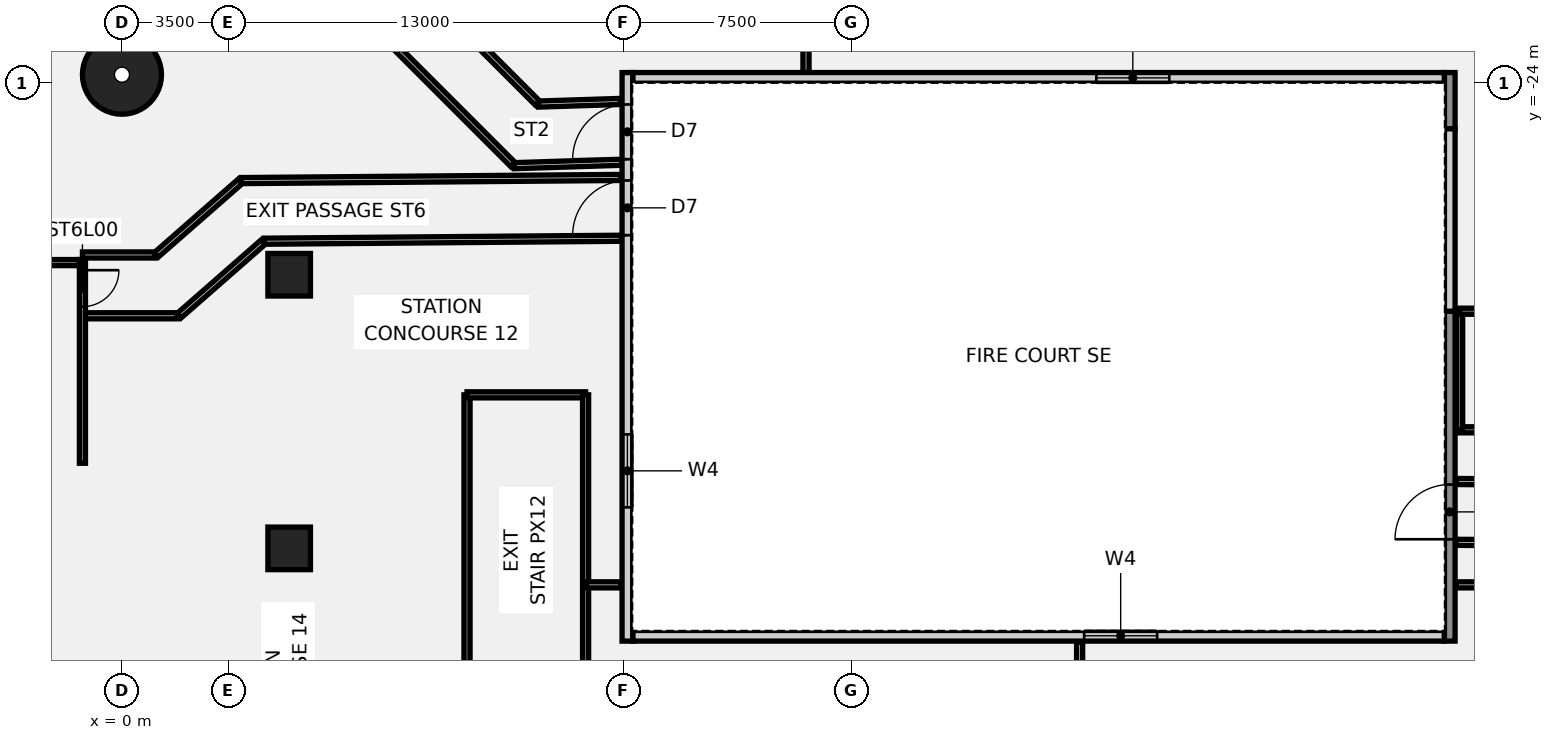
"""IFC4 building model, lengths in metres.
Left out: names, types, materials, properties, quantities, classifications, styles, units other than length and angle.
Written with IfcOpenShell. Run it as: python <this file> out.ifc"""

import sys

from ifc_helpers import new_model, si_unit, direction, frame, frame_2d, origin, origin_2d, place, context, subcontext, project, spatial, polyline, rectangle, circle, outline, extrude, element, fill, save


model = new_model("IFC4")
c1 = context("Model", 3, precision=1e-05, world=origin(), true_north=direction((0.0, 1.0)))
c2 = subcontext(c1, "Body", "Model", "MODEL_VIEW")
j1 = project(units=[si_unit("LENGTHUNIT", "METRE"), si_unit("PLANEANGLEUNIT", "RADIAN")], contexts=[c1])
p1 = place(None, origin())
s1 = spatial("IfcSite", under=j1, at=p1, CompositionType="ELEMENT")
p2 = place(p1, origin())
s2 = spatial("IfcBuilding", under=s1, at=p2, CompositionType="ELEMENT")
p3 = place(p2, origin())
s3 = spatial("IfcBuildingStorey", under=s2, at=p3, CompositionType="ELEMENT", Elevation=0.0)
p4 = place(p3, frame((0.0, -23.721, -0.55), z_axis=(0.0, 0.0, 1.0), x_axis=(1.0, 0.0, 0.0)))
e1 = element("IfcColumn", 1, at=p4, inside=s3, PredefinedType="COLUMN", context=c2, shape_type="SweptSolid", body=[
    extrude(circle(Radius=1.3, at=origin_2d()), origin(), (0.0, 0.0, 1.0), 9.05),
])
for number, where, z_axis, x_axis in (
    (2, (5.5, -39.3, -0.55), (0.0, 0.0, 1.0), (1.0, 0.0, 0.0)),
    (3, (5.5, -30.3, -0.55), (0.0, 0.0, 1.0), (1.0, 0.0, 0.0)),
):
    element("IfcColumn", number, at=place(p3, frame(where, z_axis=z_axis, x_axis=x_axis)), inside=s3, PredefinedType="COLUMN", context=c2, shape_type="SweptSolid", body=[
        extrude(rectangle(XDim=1.4, YDim=1.4, at=origin_2d()), origin(), (0.0, 0.0, 1.0), 9.05),
    ])
p5 = place(p3, frame((11.35, -45.75, 0.0), z_axis=(0.0, 0.0, 1.0), x_axis=(0.0, 1.0, 0.0)))
e4 = element("IfcWall", 4, at=p5, inside=s3, PredefinedType="PARTITIONING", context=c2, shape_type="SweptSolid", body=[
    extrude(rectangle(XDim=11.5, YDim=0.2, at=frame_2d((5.75, 0.0))), origin(), (0.0, 0.0, 1.0), 8.5),
])
p6 = place(p3, frame((11.35, -34.25, 0.0), z_axis=(0.0, 0.0, 1.0), x_axis=(1.0, 0.0, 0.0)))
e5 = element("IfcWall", 5, at=p6, inside=s3, PredefinedType="PARTITIONING", context=c2, shape_type="SweptSolid", body=[
    extrude(rectangle(XDim=3.9, YDim=0.2, at=frame_2d((1.95, 0.0))), origin(), (0.0, 0.0, 1.0), 8.5),
])
p7 = place(p3, frame((15.25, -45.75, 0.0), z_axis=(0.0, 0.0, 1.0), x_axis=(0.0, 1.0, 0.0)))
e6 = element("IfcWall", 6, at=p7, inside=s3, PredefinedType="PARTITIONING", context=c2, shape_type="SweptSolid", body=[
    extrude(rectangle(XDim=11.5, YDim=0.2, at=frame_2d((5.75, 0.0))), origin(), (0.0, 0.0, 1.0), 8.5),
])
p8 = place(p3, frame((44.0, -35.4, 0.0), z_axis=(0.0, 0.0, 1.0), x_axis=(1.0, 0.0, 0.0)))
e7 = element("IfcWall", 7, at=p8, inside=s3, PredefinedType="PARTITIONING", context=c2, shape_type="SweptSolid", body=[
    extrude(rectangle(XDim=11.5, YDim=0.2, at=frame_2d((5.75, 0.0))), origin(), (0.0, 0.0, 1.0), 8.5),
])
p9 = place(p8, frame((9.94, 0.0, 0.0)))
e8 = element("IfcOpeningElement", 8, at=p9, cuts=e7, PredefinedType="OPENING", context=c2, shape_type="SweptSolid", body=[
    extrude(rectangle(XDim=1.2, YDim=2.1, at=frame_2d((0.6, 1.05))), frame((0.0, 0.11, 0.0), z_axis=(0.0, -1.0, 0.0), x_axis=(1.0, 0.0, 0.0)), (0.0, 0.0, 1.0), 0.22),
])
p10 = place(p3, frame((44.0, -35.4, 0.0), z_axis=(0.0, 0.0, 1.0), x_axis=(0.0, 1.0, 0.0)))
e9 = element("IfcWall", 9, at=p10, inside=s3, PredefinedType="PARTITIONING", context=c2, shape_type="SweptSolid", body=[
    extrude(rectangle(XDim=3.9, YDim=0.2, at=frame_2d((1.95, 0.0))), origin(), (0.0, 0.0, 1.0), 8.5),
])
p11 = place(p3, frame((44.0, -31.5, 0.0), z_axis=(0.0, 0.0, 1.0), x_axis=(1.0, 0.0, 0.0)))
e10 = element("IfcWall", 10, at=p11, inside=s3, PredefinedType="PARTITIONING", context=c2, shape_type="SweptSolid", body=[
    extrude(rectangle(XDim=11.5, YDim=0.2, at=frame_2d((5.75, 0.0))), origin(), (0.0, 0.0, 1.0), 8.5),
])
p12 = place(p3, frame((15.28, -40.5, 0.0), z_axis=(0.0, 0.0, 1.0), x_axis=(1.0, 0.0, 0.0)))
e11 = element("IfcWall", 11, at=p12, inside=s3, PredefinedType="PARTITIONING", context=c2, shape_type="SweptSolid", body=[
    extrude(rectangle(XDim=1.14, YDim=0.2, at=frame_2d((0.57, 0.0))), origin(), (0.0, 0.0, 1.0), 8.5),
])
p13 = place(p3, frame((31.5, -59.699, 0.0), z_axis=(0.0, 0.0, 1.0), x_axis=(0.0, 1.0, 0.0)))
e12 = element("IfcWall", 12, at=p13, inside=s3, PredefinedType="PARTITIONING", context=c2, shape_type="SweptSolid", body=[
    extrude(rectangle(XDim=17.319, YDim=0.2, at=frame_2d((8.66, 0.0))), origin(), (0.0, 0.0, 1.0), 8.5),
])
p14 = place(p3, frame((43.88, -40.5, 0.0), z_axis=(0.0, 0.0, 1.0), x_axis=(1.0, 0.0, 0.0)))
e13 = element("IfcWall", 13, at=p14, inside=s3, PredefinedType="PARTITIONING", context=c2, shape_type="SweptSolid", body=[
    extrude(rectangle(XDim=25.819, YDim=0.2, at=frame_2d((12.91, 0.0))), origin(), (0.0, 0.0, 1.0), 8.5),
])
p15 = place(p14, frame((17.663, 0.0, 0.0)))
e14 = element("IfcOpeningElement", 14, at=p15, cuts=e13, PredefinedType="OPENING", context=c2, shape_type="SweptSolid", body=[
    extrude(rectangle(XDim=1.8, YDim=2.1, at=frame_2d((0.9, 1.05))), frame((0.0, 0.11, 0.0), z_axis=(0.0, -1.0, 0.0), x_axis=(1.0, 0.0, 0.0)), (0.0, 0.0, 1.0), 0.22),
])
p16 = place(p3, frame((22.5, -18.5, 0.0), z_axis=(0.0, 0.0, 1.0), x_axis=(0.0, -1.0, 0.0)))
e15 = element("IfcWall", 15, at=p16, inside=s3, PredefinedType="PARTITIONING", context=c2, shape_type="SweptSolid", body=[
    extrude(rectangle(XDim=5.15, YDim=0.2, at=frame_2d((2.575, 0.0))), origin(), (0.0, 0.0, 1.0), 8.5),
])
p17 = place(p3, frame((-1.3, -29.65, 0.0), z_axis=(0.0, 0.0, 1.0), x_axis=(1.0, 0.0, 0.0)))
e16 = element("IfcWall", 16, at=p17, inside=s3, PredefinedType="PARTITIONING", context=c2, shape_type="SweptSolid", body=[
    extrude(rectangle(XDim=2.374, YDim=0.2, at=frame_2d((1.187, 0.0))), origin(), (0.0, 0.0, 1.0), 8.5),
])
p18 = place(p3, frame((1.124, -29.65, 0.0), z_axis=(0.0, 0.0, 1.0), x_axis=(0.752593197415, 0.658485747154, 0.0)))
e17 = element("IfcWall", 17, at=p18, inside=s3, PredefinedType="PARTITIONING", context=c2, shape_type="SweptSolid", body=[
    extrude(rectangle(XDim=3.666, YDim=0.2, at=frame_2d((1.833, 0.0))), origin(), (0.0, 0.0, 1.0), 8.5),
])
p19 = place(p3, frame((3.921, -27.203, 0.0), z_axis=(0.0, 0.0, 1.0), x_axis=(0.999965985762, 0.008247867521, 0.0)))
e18 = element("IfcWall", 18, at=p19, inside=s3, PredefinedType="PARTITIONING", context=c2, shape_type="SweptSolid", body=[
    extrude(rectangle(XDim=12.491, YDim=0.2, at=frame_2d((6.246, 0.0))), origin(), (0.0, 0.0, 1.0), 8.5),
])
p20 = place(p3, frame((-1.3, -31.65, 0.0), z_axis=(0.0, 0.0, 1.0), x_axis=(1.0, 0.0, 0.0)))
e19 = element("IfcWall", 19, at=p20, inside=s3, PredefinedType="PARTITIONING", context=c2, shape_type="SweptSolid", body=[
    extrude(rectangle(XDim=3.126, YDim=0.2, at=frame_2d((1.563, 0.0))), origin(), (0.0, 0.0, 1.0), 8.5),
])
p21 = place(p3, frame((1.876, -31.65, 0.0), z_axis=(0.0, 0.0, 1.0), x_axis=(0.75257257963, 0.658509310784, 0.0)))
e20 = element("IfcWall", 20, at=p21, inside=s3, PredefinedType="PARTITIONING", context=c2, shape_type="SweptSolid", body=[
    extrude(rectangle(XDim=3.675, YDim=0.2, at=frame_2d((1.838, 0.0))), origin(), (0.0, 0.0, 1.0), 8.5),
])
p22 = place(p3, frame((4.679, -29.197, 0.0), z_axis=(0.0, 0.0, 1.0), x_axis=(0.99996597443, 0.008249241373, 0.0)))
e21 = element("IfcWall", 21, at=p22, inside=s3, PredefinedType="PARTITIONING", context=c2, shape_type="SweptSolid", body=[
    extrude(rectangle(XDim=11.75, YDim=0.2, at=frame_2d((5.875, 0.0))), origin(), (0.0, 0.0, 1.0), 8.5),
])
p23 = place(p3, frame((7.738, -18.724, 0.0), z_axis=(0.0, 0.0, 1.0), x_axis=(0.707121343443, -0.70709221863, 0.0)))
e22 = element("IfcWall", 22, at=p23, inside=s3, PredefinedType="PARTITIONING", context=c2, shape_type="SweptSolid", body=[
    extrude(rectangle(XDim=8.383, YDim=0.2, at=frame_2d((4.191, 0.0))), origin(), (0.0, 0.0, 1.0), 8.5),
])
p24 = place(p3, frame((13.701, -24.687, 0.0), z_axis=(0.0, 0.0, 1.0), x_axis=(0.999488950114, 0.031966210289, 0.0)))
e23 = element("IfcWall", 23, at=p24, inside=s3, PredefinedType="PARTITIONING", context=c2, shape_type="SweptSolid", body=[
    extrude(rectangle(XDim=2.688, YDim=0.2, at=frame_2d((1.344, 0.0))), origin(), (0.0, 0.0, 1.0), 8.5),
])
p25 = place(p3, frame((5.862, -19.676, 0.0), z_axis=(0.0, 0.0, 1.0), x_axis=(0.707106781187, -0.707106781187, 0.0)))
e24 = element("IfcWall", 24, at=p25, inside=s3, PredefinedType="PARTITIONING", context=c2, shape_type="SweptSolid", body=[
    extrude(rectangle(XDim=9.902, YDim=0.2, at=frame_2d((4.951, 0.0))), origin(), (0.0, 0.0, 1.0), 8.5),
])
p26 = place(p3, frame((12.899, -26.713, 0.0), z_axis=(0.0, 0.0, 1.0), x_axis=(0.999487091524, 0.032024270122, 0.0)))
e25 = element("IfcWall", 25, at=p26, inside=s3, PredefinedType="PARTITIONING", context=c2, shape_type="SweptSolid", body=[
    extrude(rectangle(XDim=3.552, YDim=0.2, at=frame_2d((1.776, 0.0))), origin(), (0.0, 0.0, 1.0), 8.5),
])
p27 = place(p3, frame((55.725, -39.209, 0.0), z_axis=(0.0, 0.0, 1.0), x_axis=(-0.999957626969, 0.009205664901, 0.0)))
e26 = element("IfcWall", 26, at=p27, inside=s3, PredefinedType="PARTITIONING", context=c2, shape_type="SweptSolid", body=[
    extrude(rectangle(XDim=11.855, YDim=0.2, at=frame_2d((5.927, 0.0))), origin(), (0.0, 0.0, 1.0), 8.5),
])
p28 = place(p3, frame((53.725, -37.191, 0.0), z_axis=(0.0, 0.0, 1.0), x_axis=(-0.999957602643, 0.009208306954, 0.0)))
e27 = element("IfcWall", 27, at=p28, inside=s3, PredefinedType="PARTITIONING", context=c2, shape_type="SweptSolid", body=[
    extrude(rectangle(XDim=9.836, YDim=0.2, at=frame_2d((4.918, 0.0))), origin(), (0.0, 0.0, 1.0), 8.5),
])
p29 = place(p3, frame((16.8, -42.175, 0.0), z_axis=(0.0, 0.0, 1.0), x_axis=(1.0, 0.0, 0.0)))
e28 = element("IfcWall", 28, at=p29, inside=s3, PredefinedType="SOLIDWALL", context=c2, shape_type="SweptSolid", body=[
    extrude(rectangle(XDim=26.7, YDim=0.35, at=frame_2d((13.35, 0.0))), origin(), (0.0, 0.0, 1.0), 8.5),
])
p30 = place(p29, frame((14.85, 0.0, 1.0)))
e29 = element("IfcOpeningElement", 29, at=p30, cuts=e28, PredefinedType="OPENING", context=c2, shape_type="SweptSolid", body=[
    extrude(rectangle(XDim=2.4, YDim=1.8, at=frame_2d((1.2, 0.9))), frame((0.0, 0.185, 0.0), z_axis=(0.0, -1.0, 0.0), x_axis=(1.0, 0.0, 0.0)), (0.0, 0.0, 1.0), 0.37),
])
p31 = place(p3, frame((16.8, -23.825, 0.0), z_axis=(0.0, 0.0, 1.0), x_axis=(1.0, 0.0, 0.0)))
e30 = element("IfcWall", 30, at=p31, inside=s3, PredefinedType="SOLIDWALL", context=c2, shape_type="SweptSolid", body=[
    extrude(rectangle(XDim=26.7, YDim=0.35, at=frame_2d((13.35, 0.0))), origin(), (0.0, 0.0, 1.0), 8.5),
])
p32 = place(p31, frame((15.25, 0.0, 1.0)))
e31 = element("IfcOpeningElement", 31, at=p32, cuts=e30, PredefinedType="OPENING", context=c2, shape_type="SweptSolid", body=[
    extrude(rectangle(XDim=2.4, YDim=1.8, at=frame_2d((1.2, 0.9))), frame((0.0, 0.185, 0.0), z_axis=(0.0, -1.0, 0.0), x_axis=(1.0, 0.0, 0.0)), (0.0, 0.0, 1.0), 0.37),
])
p33 = place(p3, frame((16.625, -42.35, 0.0), z_axis=(0.0, 0.0, 1.0), x_axis=(0.0, 1.0, 0.0)))
e32 = element("IfcWall", 32, at=p33, inside=s3, PredefinedType="SOLIDWALL", context=c2, shape_type="SweptSolid", body=[
    extrude(rectangle(XDim=18.7, YDim=0.35, at=frame_2d((9.35, 0.0))), origin(), (0.0, 0.0, 1.0), 8.5),
])
p34 = place(p33, frame((13.35, 0.0, 0.0)))
e33 = element("IfcOpeningElement", 33, at=p34, cuts=e32, PredefinedType="OPENING", context=c2, shape_type="SweptSolid", body=[
    extrude(rectangle(XDim=1.8, YDim=2.4, at=frame_2d((0.9, 1.2))), frame((0.0, 0.185, 0.0), z_axis=(0.0, -1.0, 0.0), x_axis=(1.0, 0.0, 0.0)), (0.0, 0.0, 1.0), 0.37),
])
p35 = place(p33, frame((15.85, 0.0, 0.0)))
e34 = element("IfcOpeningElement", 34, at=p35, cuts=e32, PredefinedType="OPENING", context=c2, shape_type="SweptSolid", body=[
    extrude(rectangle(XDim=1.8, YDim=2.4, at=frame_2d((0.9, 1.2))), frame((0.0, 0.185, 0.0), z_axis=(0.0, -1.0, 0.0), x_axis=(1.0, 0.0, 0.0)), (0.0, 0.0, 1.0), 0.37),
])
p36 = place(p33, frame((4.4, 0.0, 1.0)))
e35 = element("IfcOpeningElement", 35, at=p36, cuts=e32, PredefinedType="OPENING", context=c2, shape_type="SweptSolid", body=[
    extrude(rectangle(XDim=2.4, YDim=1.8, at=frame_2d((1.2, 0.9))), frame((0.0, 0.185, 0.0), z_axis=(0.0, -1.0, 0.0), x_axis=(1.0, 0.0, 0.0)), (0.0, 0.0, 1.0), 0.37),
])
p37 = place(p3, frame((43.675, -42.35, 0.0), z_axis=(0.0, 0.0, 1.0), x_axis=(0.0, 1.0, 0.0)))
e36 = element("IfcWall", 36, at=p37, inside=s3, PredefinedType="SOLIDWALL", context=c2, shape_type="SweptSolid", body=[
    extrude(rectangle(XDim=10.85, YDim=0.35, at=frame_2d((5.425, 0.0))), origin(), (0.0, 0.0, 1.0), 8.5),
])
p38 = place(p37, frame((3.35, 0.0, 0.0)))
e37 = element("IfcOpeningElement", 37, at=p38, cuts=e36, PredefinedType="OPENING", context=c2, shape_type="SweptSolid", body=[
    extrude(rectangle(XDim=1.8, YDim=2.4, at=frame_2d((0.9, 1.2))), frame((0.0, 0.185, 0.0), z_axis=(0.0, -1.0, 0.0), x_axis=(1.0, 0.0, 0.0)), (0.0, 0.0, 1.0), 0.37),
])
p39 = place(p3, frame((43.675, -25.5, 0.0), z_axis=(0.0, 0.0, 1.0), x_axis=(0.0, 1.0, 0.0)))
e38 = element("IfcWall", 38, at=p39, inside=s3, PredefinedType="SOLIDWALL", context=c2, shape_type="SweptSolid", body=[
    extrude(rectangle(XDim=1.85, YDim=0.35, at=frame_2d((0.925, 0.0))), origin(), (0.0, 0.0, 1.0), 8.5),
])
p40 = place(p3, frame((43.675, -31.5, 4.9), z_axis=(0.0, 0.0, 1.0), x_axis=(0.0, 1.0, 0.0)))
e39 = element("IfcWall", 39, at=p40, inside=s3, PredefinedType="SOLIDWALL", context=c2, shape_type="SweptSolid", body=[
    extrude(rectangle(XDim=6.0, YDim=0.35, at=frame_2d((3.0, 0.0))), origin(), (0.0, 0.0, 1.0), 3.6),
])
p41 = place(p3, frame((-1.3, -29.8, 0.0), z_axis=(0.0, 0.0, 1.0), x_axis=(0.0, -1.0, 0.0)))
e40 = element("IfcWall", 40, at=p41, inside=s3, PredefinedType="SHEAR", context=c2, shape_type="SweptSolid", body=[
    extrude(rectangle(XDim=6.7, YDim=0.2, at=frame_2d((3.35, 0.0))), origin(), (0.0, 0.0, 1.0), 8.5),
])
p42 = place(p41, frame((0.35, 0.0, 0.0)))
e41 = element("IfcOpeningElement", 41, at=p42, cuts=e40, PredefinedType="OPENING", context=c2, shape_type="SweptSolid", body=[
    extrude(rectangle(XDim=1.2, YDim=2.1, at=frame_2d((0.6, 1.05))), frame((0.0, 0.11, 0.0), z_axis=(0.0, -1.0, 0.0), x_axis=(1.0, 0.0, 0.0)), (0.0, 0.0, 1.0), 0.22),
])
p43 = place(p3, frame((-4.6, -29.9, 0.0), z_axis=(0.0, 0.0, 1.0), x_axis=(1.0, 0.0, 0.0)))
e42 = element("IfcWall", 42, at=p43, inside=s3, PredefinedType="SHEAR", context=c2, shape_type="SweptSolid", body=[
    extrude(rectangle(XDim=3.2, YDim=0.2, at=frame_2d((1.6, 0.0))), origin(), (0.0, 0.0, 1.0), 8.5),
])
p44 = place(p3, origin())
e43 = element("IfcWall", 43, at=p44, inside=s3, PredefinedType="SHEAR", context=c2, shape_type="SweptSolid", body=[
    extrude(outline(polyline([(-4.6, -36.3), (-4.6, -36.5), (-1.4, -36.5), (-1.4, -36.3), (-4.6, -36.3)])), origin(), (0.0, 0.0, 1.0), 8.5),
])
p45 = place(p30, origin())
e44 = element("IfcWindow", 44, at=p45, inside=s3, PartitioningType="SINGLE_PANEL", PredefinedType="WINDOW", context=c2, shape_type="SweptSolid", body=[
    extrude(rectangle(XDim=2.4, YDim=1.8, at=frame_2d((1.2, 0.9))), frame((0.0, 0.03, 0.0), z_axis=(0.0, -1.0, 0.0), x_axis=(1.0, 0.0, 0.0)), (0.0, 0.0, 1.0), 0.06),
])
fill(e29, e44)
p46 = place(p32, origin())
e45 = element("IfcWindow", 45, at=p46, inside=s3, PartitioningType="SINGLE_PANEL", PredefinedType="WINDOW", context=c2, shape_type="SweptSolid", body=[
    extrude(rectangle(XDim=2.4, YDim=1.8, at=frame_2d((1.2, 0.9))), frame((0.0, 0.03, 0.0), z_axis=(0.0, -1.0, 0.0), x_axis=(1.0, 0.0, 0.0)), (0.0, 0.0, 1.0), 0.06),
])
fill(e31, e45)
p47 = place(p34, frame((1.8, 0.0, 0.0), z_axis=(0.0, 0.0, 1.0), x_axis=(-1.0, 0.0, 0.0)))
e46 = element("IfcDoor", 46, at=p47, inside=s3, OperationType="SINGLE_SWING_LEFT", PredefinedType="DOOR", context=c2, shape_type="SweptSolid", body=[
    extrude(rectangle(XDim=1.8, YDim=2.4, at=frame_2d((0.9, 1.2))), frame((0.0, 0.025, 0.0), z_axis=(0.0, -1.0, 0.0), x_axis=(1.0, 0.0, 0.0)), (0.0, 0.0, 1.0), 0.05),
])
fill(e33, e46)
p48 = place(p35, frame((1.8, 0.0, 0.0), z_axis=(0.0, 0.0, 1.0), x_axis=(-1.0, 0.0, 0.0)))
e47 = element("IfcDoor", 47, at=p48, inside=s3, OperationType="SINGLE_SWING_LEFT", PredefinedType="DOOR", context=c2, shape_type="SweptSolid", body=[
    extrude(rectangle(XDim=1.8, YDim=2.4, at=frame_2d((0.9, 1.2))), frame((0.0, 0.025, 0.0), z_axis=(0.0, -1.0, 0.0), x_axis=(1.0, 0.0, 0.0)), (0.0, 0.0, 1.0), 0.05),
])
fill(e34, e47)
p49 = place(p36, origin())
e48 = element("IfcWindow", 48, at=p49, inside=s3, PartitioningType="SINGLE_PANEL", PredefinedType="WINDOW", context=c2, shape_type="SweptSolid", body=[
    extrude(rectangle(XDim=2.4, YDim=1.8, at=frame_2d((1.2, 0.9))), frame((0.0, 0.03, 0.0), z_axis=(0.0, -1.0, 0.0), x_axis=(1.0, 0.0, 0.0)), (0.0, 0.0, 1.0), 0.06),
])
fill(e35, e48)
p50 = place(p38, origin())
e49 = element("IfcDoor", 49, at=p50, inside=s3, OperationType="SINGLE_SWING_LEFT", PredefinedType="DOOR", context=c2, shape_type="SweptSolid", body=[
    extrude(rectangle(XDim=1.8, YDim=2.4, at=frame_2d((0.9, 1.2))), frame((0.0, 0.025, 0.0), z_axis=(0.0, -1.0, 0.0), x_axis=(1.0, 0.0, 0.0)), (0.0, 0.0, 1.0), 0.05),
])
fill(e37, e49)
p51 = place(p42, origin())
e50 = element("IfcDoor", 50, at=p51, inside=s3, OperationType="SINGLE_SWING_LEFT", PredefinedType="DOOR", context=c2, shape_type="SweptSolid", body=[
    extrude(rectangle(XDim=1.2, YDim=2.1, at=frame_2d((0.6, 1.05))), frame((0.0, 0.025, 0.0), z_axis=(0.0, -1.0, 0.0), x_axis=(1.0, 0.0, 0.0)), (0.0, 0.0, 1.0), 0.05),
])
fill(e41, e50)
save(model, sys.argv[1])
